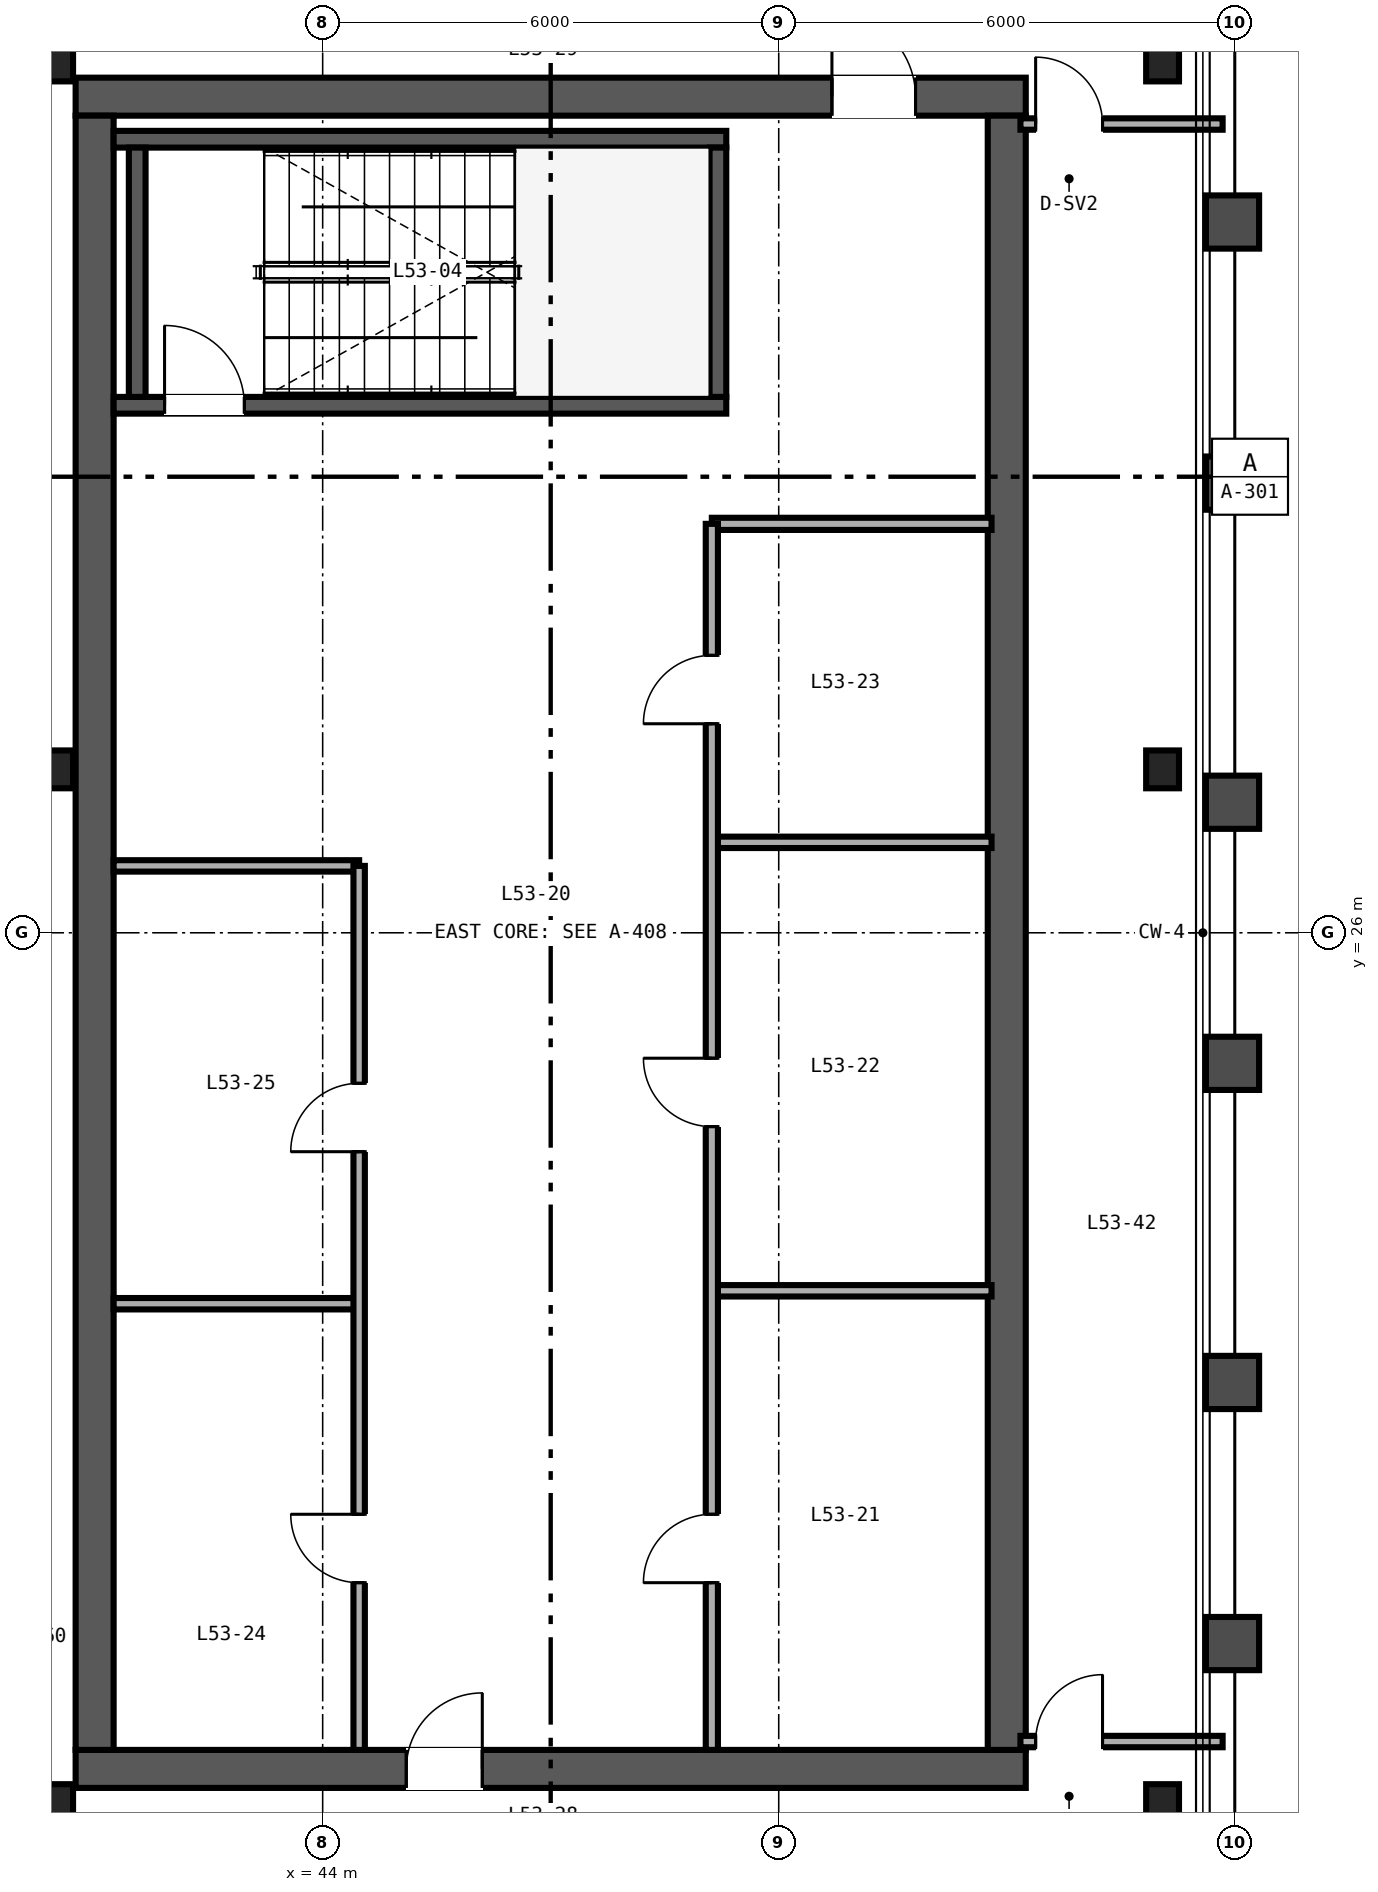
"""IFC4 building model, lengths in metres.
Left out: names, types, materials, properties, quantities, classifications, styles, units other than length and angle.
Written with IfcOpenShell. Run it as: python <this file> out.ifc"""

import sys

from ifc_helpers import new_model, si_unit, direction, frame, frame_2d, origin, origin_2d, place, context, subcontext, project, spatial, rectangle, i_section, extrude, source, transform, mapped, element, fill, save


model = new_model("IFC4")
c1 = context("Model", 3, precision=1e-05, world=origin(), true_north=direction((0.0, 1.0)))
c2 = subcontext(c1, "Body", "Model", "MODEL_VIEW")
j1 = project(units=[si_unit("LENGTHUNIT", "METRE"), si_unit("PLANEANGLEUNIT", "RADIAN")], contexts=[c1])
p1 = place(None, origin())
s1 = spatial("IfcSite", under=j1, at=p1, CompositionType="ELEMENT")
p2 = place(p1, origin())
s2 = spatial("IfcBuilding", under=s1, at=p2, CompositionType="ELEMENT")
p3 = place(p2, frame((0.0, 0.0, 210.0)))
s3 = spatial("IfcBuildingStorey", under=s2, at=p3, CompositionType="ELEMENT", Elevation=210.0)
p4 = place(p3, frame((40.75, 15.0, 0.0), z_axis=(0.0, 0.0, 1.0), x_axis=(1.0, 0.0, 0.0)))
e1 = element("IfcWall", 1, at=p4, inside=s3, PredefinedType="SHEAR", context=c2, shape_type="SweptSolid", body=[
    extrude(rectangle(XDim=12.5, YDim=0.5, at=frame_2d((6.25, 0.0))), origin(), (0.0, 0.0, 1.0), 3.37),
])
p5 = place(p4, frame((4.35, 0.0, 0.0)))
e2 = element("IfcOpeningElement", 2, at=p5, cuts=e1, PredefinedType="OPENING", context=c2, shape_type="SweptSolid", body=[
    extrude(rectangle(XDim=1.0, YDim=2.15, at=frame_2d((0.5, 1.075))), frame((0.0, 0.26, 0.0), z_axis=(0.0, -1.0, 0.0), x_axis=(1.0, 0.0, 0.0)), (0.0, 0.0, 1.0), 0.52),
])
p6 = place(p3, frame((40.75, 37.0, 0.0), z_axis=(0.0, 0.0, 1.0), x_axis=(1.0, 0.0, 0.0)))
e3 = element("IfcWall", 3, at=p6, inside=s3, PredefinedType="SHEAR", context=c2, shape_type="SweptSolid", body=[
    extrude(rectangle(XDim=12.5, YDim=0.5, at=frame_2d((6.25, 0.0))), origin(), (0.0, 0.0, 1.0), 3.37),
])
p7 = place(p6, frame((9.95, 0.0, 0.0)))
e4 = element("IfcOpeningElement", 4, at=p7, cuts=e3, PredefinedType="OPENING", context=c2, shape_type="SweptSolid", body=[
    extrude(rectangle(XDim=1.1, YDim=2.15, at=frame_2d((0.55, 1.075))), frame((0.0, 0.26, 0.0), z_axis=(0.0, -1.0, 0.0), x_axis=(1.0, 0.0, 0.0)), (0.0, 0.0, 1.0), 0.52),
])
for number, where, z_axis, x_axis in (
    (5, (41.0, 15.25, 0.0), (0.0, 0.0, 1.0), (0.0, 1.0, 0.0)),
    (6, (53.0, 15.25, 0.0), (0.0, 0.0, 1.0), (0.0, 1.0, 0.0)),
):
    element("IfcWall", number, at=place(p3, frame(where, z_axis=z_axis, x_axis=x_axis)), inside=s3, PredefinedType="SHEAR", context=c2, shape_type="SweptSolid", body=[
        extrude(rectangle(XDim=21.5, YDim=0.5, at=frame_2d((10.75, 0.0))), origin(), (0.0, 0.0, 1.0), 3.37),
    ])
p8 = place(p3, frame((41.25, 32.94, 0.0), z_axis=(0.0, 0.0, 1.0), x_axis=(1.0, 0.0, 0.0)))
e7 = element("IfcWall", 7, at=p8, inside=s3, PredefinedType="SHEAR", context=c2, shape_type="SweptSolid", body=[
    extrude(rectangle(XDim=8.06, YDim=0.22, at=frame_2d((4.03, 0.0))), origin(), (0.0, 0.0, 1.0), 3.4),
])
p9 = place(p8, frame((0.67, 0.0, 0.0)))
e8 = element("IfcOpeningElement", 8, at=p9, cuts=e7, PredefinedType="OPENING", context=c2, shape_type="SweptSolid", body=[
    extrude(rectangle(XDim=1.05, YDim=2.15, at=frame_2d((0.525, 1.075))), frame((0.0, 0.12, 0.0), z_axis=(0.0, -1.0, 0.0), x_axis=(1.0, 0.0, 0.0)), (0.0, 0.0, 1.0), 0.24),
])
p10 = place(p3, frame((41.25, 36.44, 0.0), z_axis=(0.0, 0.0, 1.0), x_axis=(1.0, 0.0, 0.0)))
e9 = element("IfcWall", 9, at=p10, inside=s3, PredefinedType="SHEAR", context=c2, shape_type="SweptSolid", body=[
    extrude(rectangle(XDim=8.06, YDim=0.22, at=frame_2d((4.03, 0.0))), origin(), (0.0, 0.0, 1.0), 3.4),
])
for number, where, z_axis, x_axis in (
    (10, (41.56, 33.05, 0.0), (0.0, 0.0, 1.0), (0.0, 1.0, 0.0)),
    (11, (49.2, 33.05, 0.0), (0.0, 0.0, 1.0), (0.0, 1.0, 0.0)),
):
    element("IfcWall", number, at=place(p3, frame(where, z_axis=z_axis, x_axis=x_axis)), inside=s3, PredefinedType="SHEAR", context=c2, shape_type="SweptSolid", body=[
        extrude(rectangle(XDim=3.28, YDim=0.22, at=frame_2d((1.64, 0.0))), origin(), (0.0, 0.0, 1.0), 3.4),
    ])
m1 = source(origin(), c2, "Body", "SweptSolid", [
    extrude(i_section(OverallWidth=0.432, OverallDepth=0.498, WebThickness=0.056, FlangeThickness=0.089, FilletRadius=0.025, at=origin_2d()), origin(), (0.0, 0.0, 1.0), 3.37),
])
for number, where, z_axis, x_axis in (
    (12, (40.5, 14.55, 0.0), (0.0, 0.0, 1.0), (1.0, 0.0, 0.0)),
    (13, (55.05, 14.55, 0.0), (0.0, 0.0, 1.0), (1.0, 0.0, 0.0)),
    (14, (40.5, 28.15, 0.0), (0.0, 0.0, 1.0), (1.0, 0.0, 0.0)),
    (15, (55.05, 28.15, 0.0), (0.0, 0.0, 1.0), (1.0, 0.0, 0.0)),
    (16, (40.5, 37.45, 0.0), (0.0, 0.0, 1.0), (1.0, 0.0, 0.0)),
    (17, (55.05, 37.45, 0.0), (0.0, 0.0, 1.0), (1.0, 0.0, 0.0)),
):
    element("IfcColumn", number, at=place(p3, frame(where, z_axis=z_axis, x_axis=x_axis)), inside=s3, PredefinedType="COLUMN", context=c2, shape_type="MappedRepresentation", body=[
        mapped(m1, transform((0.0, 0.0, 0.0), scale=1.0)),
    ])
p11 = place(p3, frame((49.12, 31.38, 0.0), z_axis=(0.0, 0.0, 1.0), x_axis=(1.0, 0.0, 0.0)))
e18 = element("IfcWall", 18, at=p11, inside=s3, PredefinedType="PARTITIONING", context=c2, shape_type="SweptSolid", body=[
    extrude(rectangle(XDim=3.68, YDim=0.16, at=frame_2d((1.84, 0.0))), origin(), (0.0, 0.0, 1.0), 2.47),
])
for number, where, z_axis, x_axis in (
    (19, (49.12, 21.29, 0.0), (0.0, 0.0, 1.0), (1.0, 0.0, 0.0)),
    (20, (49.12, 27.19, 0.0), (0.0, 0.0, 1.0), (1.0, 0.0, 0.0)),
):
    element("IfcWall", number, at=place(p3, frame(where, z_axis=z_axis, x_axis=x_axis)), inside=s3, PredefinedType="PARTITIONING", context=c2, shape_type="SweptSolid", body=[
        extrude(rectangle(XDim=3.68, YDim=0.15, at=frame_2d((1.84, 0.0))), origin(), (0.0, 0.0, 1.0), 3.37),
    ])
p12 = place(p3, frame((49.12, 15.25, 0.0), z_axis=(0.0, 0.0, 1.0), x_axis=(0.0, 1.0, 0.0)))
e21 = element("IfcWall", 21, at=p12, inside=s3, PredefinedType="PARTITIONING", context=c2, shape_type="SweptSolid", body=[
    extrude(rectangle(XDim=16.13, YDim=0.16, at=frame_2d((8.065, 0.0))), origin(), (0.0, 0.0, 1.0), 2.443),
])
p13 = place(p12, frame((2.2, 0.0, 0.0)))
e22 = element("IfcOpeningElement", 22, at=p13, cuts=e21, PredefinedType="OPENING", context=c2, shape_type="SweptSolid", body=[
    extrude(rectangle(XDim=0.9, YDim=2.15, at=frame_2d((0.45, 1.075))), frame((0.0, 0.09, 0.0), z_axis=(0.0, -1.0, 0.0), x_axis=(1.0, 0.0, 0.0)), (0.0, 0.0, 1.0), 0.18),
])
p14 = place(p12, frame((8.2, 0.0, 0.0)))
e23 = element("IfcOpeningElement", 23, at=p14, cuts=e21, PredefinedType="OPENING", context=c2, shape_type="SweptSolid", body=[
    extrude(rectangle(XDim=0.9, YDim=2.15, at=frame_2d((0.45, 1.075))), frame((0.0, 0.09, 0.0), z_axis=(0.0, -1.0, 0.0), x_axis=(1.0, 0.0, 0.0)), (0.0, 0.0, 1.0), 0.18),
])
p15 = place(p12, frame((13.5, 0.0, 0.0)))
e24 = element("IfcOpeningElement", 24, at=p15, cuts=e21, PredefinedType="OPENING", context=c2, shape_type="SweptSolid", body=[
    extrude(rectangle(XDim=0.9, YDim=2.15, at=frame_2d((0.45, 1.075))), frame((0.0, 0.09, 0.0), z_axis=(0.0, -1.0, 0.0), x_axis=(1.0, 0.0, 0.0)), (0.0, 0.0, 1.0), 0.18),
])
for number, where, z_axis, x_axis in (
    (25, (41.25, 26.88, 0.0), (0.0, 0.0, 1.0), (1.0, 0.0, 0.0)),
    (26, (41.25, 21.12, 0.0), (0.0, 0.0, 1.0), (1.0, 0.0, 0.0)),
):
    element("IfcWall", number, at=place(p3, frame(where, z_axis=z_axis, x_axis=x_axis)), inside=s3, PredefinedType="PARTITIONING", context=c2, shape_type="SweptSolid", body=[
        extrude(rectangle(XDim=3.23, YDim=0.15, at=frame_2d((1.615, 0.0))), origin(), (0.0, 0.0, 1.0), 3.37),
    ])
p16 = place(p3, frame((44.48, 15.25, 0.0), z_axis=(0.0, 0.0, 1.0), x_axis=(0.0, 1.0, 0.0)))
e27 = element("IfcWall", 27, at=p16, inside=s3, PredefinedType="PARTITIONING", context=c2, shape_type="SweptSolid", body=[
    extrude(rectangle(XDim=11.63, YDim=0.15, at=frame_2d((5.815, 0.0))), origin(), (0.0, 0.0, 1.0), 3.37),
])
p17 = place(p16, frame((2.2, 0.0, 0.0)))
e28 = element("IfcOpeningElement", 28, at=p17, cuts=e27, PredefinedType="OPENING", context=c2, shape_type="SweptSolid", body=[
    extrude(rectangle(XDim=0.9, YDim=2.15, at=frame_2d((0.45, 1.075))), frame((0.0, 0.085, 0.0), z_axis=(0.0, -1.0, 0.0), x_axis=(1.0, 0.0, 0.0)), (0.0, 0.0, 1.0), 0.17),
])
p18 = place(p16, frame((7.87, 0.0, 0.0)))
e29 = element("IfcOpeningElement", 29, at=p18, cuts=e27, PredefinedType="OPENING", context=c2, shape_type="SweptSolid", body=[
    extrude(rectangle(XDim=0.9, YDim=2.15, at=frame_2d((0.45, 1.075))), frame((0.0, 0.085, 0.0), z_axis=(0.0, -1.0, 0.0), x_axis=(1.0, 0.0, 0.0)), (0.0, 0.0, 1.0), 0.17),
])
p19 = place(p3, frame((53.18, 15.36, 0.0), z_axis=(0.0, 0.0, 1.0), x_axis=(1.0, 0.0, 0.0)))
e30 = element("IfcWall", 30, at=p19, inside=s3, PredefinedType="PARTITIONING", context=c2, shape_type="SweptSolid", body=[
    extrude(rectangle(XDim=2.66, YDim=0.15, at=frame_2d((1.33, 0.0))), origin(), (0.0, 0.0, 1.0), 2.591),
])
p20 = place(p19, frame((0.2, 0.0, 0.0)))
e31 = element("IfcOpeningElement", 31, at=p20, cuts=e30, PredefinedType="OPENING", context=c2, shape_type="SweptSolid", body=[
    extrude(rectangle(XDim=0.88, YDim=2.15, at=frame_2d((0.44, 1.075))), frame((0.0, 0.085, 0.0), z_axis=(0.0, -1.0, 0.0), x_axis=(1.0, 0.0, 0.0)), (0.0, 0.0, 1.0), 0.17),
])
p21 = place(p3, frame((53.18, 36.64, 0.0), z_axis=(0.0, 0.0, 1.0), x_axis=(1.0, 0.0, 0.0)))
e32 = element("IfcWall", 32, at=p21, inside=s3, PredefinedType="PARTITIONING", context=c2, shape_type="SweptSolid", body=[
    extrude(rectangle(XDim=2.66, YDim=0.15, at=frame_2d((1.33, 0.0))), origin(), (0.0, 0.0, 1.0), 2.753),
])
p22 = place(p21, frame((0.2, 0.0, 0.0)))
e33 = element("IfcOpeningElement", 33, at=p22, cuts=e32, PredefinedType="OPENING", context=c2, shape_type="SweptSolid", body=[
    extrude(rectangle(XDim=0.88, YDim=2.15, at=frame_2d((0.44, 1.075))), frame((0.0, 0.085, 0.0), z_axis=(0.0, -1.0, 0.0), x_axis=(1.0, 0.0, 0.0)), (0.0, 0.0, 1.0), 0.17),
])
m2 = source(origin(), c2, "Body", "SweptSolid", [
    extrude(rectangle(XDim=1.05, YDim=2.15, at=frame_2d((0.525, 1.075))), frame((0.0, 0.025, 0.0), z_axis=(0.0, -1.0, 0.0), x_axis=(1.0, 0.0, 0.0)), (0.0, 0.0, 1.0), 0.05),
])
p23 = place(p9, origin())
e34 = element("IfcDoor", 34, at=p23, inside=s3, OperationType="SINGLE_SWING_LEFT", PredefinedType="DOOR", context=c2, shape_type="MappedRepresentation", body=[
    mapped(m2, transform((0.0, 0.0, 0.0), scale=1.0)),
])
fill(e8, e34)
m3 = source(origin(), c2, "Body", "SweptSolid", [
    extrude(rectangle(XDim=1.0, YDim=2.15, at=frame_2d((0.5, 1.075))), frame((0.0, 0.025, 0.0), z_axis=(0.0, -1.0, 0.0), x_axis=(1.0, 0.0, 0.0)), (0.0, 0.0, 1.0), 0.05),
])
p24 = place(p5, origin())
e35 = element("IfcDoor", 35, at=p24, inside=s3, OperationType="SINGLE_SWING_RIGHT", PredefinedType="DOOR", context=c2, shape_type="MappedRepresentation", body=[
    mapped(m3, transform((0.0, 0.0, 0.0), scale=1.0)),
])
fill(e2, e35)
m4 = source(origin(), c2, "Body", "SweptSolid", [
    extrude(rectangle(XDim=1.1, YDim=2.15, at=frame_2d((0.55, 1.075))), frame((0.0, 0.025, 0.0), z_axis=(0.0, -1.0, 0.0), x_axis=(1.0, 0.0, 0.0)), (0.0, 0.0, 1.0), 0.05),
])
p25 = place(p7, origin())
e36 = element("IfcDoor", 36, at=p25, inside=s3, OperationType="SINGLE_SWING_LEFT", PredefinedType="DOOR", context=c2, shape_type="MappedRepresentation", body=[
    mapped(m4, transform((0.0, 0.0, 0.0), scale=1.0)),
])
fill(e4, e36)
m5 = source(origin(), c2, "Body", "SweptSolid", [
    extrude(rectangle(XDim=0.9, YDim=2.15, at=frame_2d((0.45, 1.075))), frame((0.0, 0.025, 0.0), z_axis=(0.0, -1.0, 0.0), x_axis=(1.0, 0.0, 0.0)), (0.0, 0.0, 1.0), 0.05),
])
p26 = place(p13, origin())
e37 = element("IfcDoor", 37, at=p26, inside=s3, OperationType="SINGLE_SWING_LEFT", PredefinedType="DOOR", context=c2, shape_type="MappedRepresentation", body=[
    mapped(m5, transform((0.0, 0.0, 0.0), scale=1.0)),
])
fill(e22, e37)
p27 = place(p14, origin())
e38 = element("IfcDoor", 38, at=p27, inside=s3, OperationType="SINGLE_SWING_RIGHT", PredefinedType="DOOR", context=c2, shape_type="MappedRepresentation", body=[
    mapped(m5, transform((0.0, 0.0, 0.0), scale=1.0)),
])
fill(e23, e38)
p28 = place(p15, origin())
e39 = element("IfcDoor", 39, at=p28, inside=s3, OperationType="SINGLE_SWING_LEFT", PredefinedType="DOOR", context=c2, shape_type="MappedRepresentation", body=[
    mapped(m5, transform((0.0, 0.0, 0.0), scale=1.0)),
])
fill(e24, e39)
p29 = place(p17, origin())
e40 = element("IfcDoor", 40, at=p29, inside=s3, OperationType="SINGLE_SWING_RIGHT", PredefinedType="DOOR", context=c2, shape_type="MappedRepresentation", body=[
    mapped(m5, transform((0.0, 0.0, 0.0), scale=1.0)),
])
fill(e28, e40)
p30 = place(p18, origin())
e41 = element("IfcDoor", 41, at=p30, inside=s3, OperationType="SINGLE_SWING_LEFT", PredefinedType="DOOR", context=c2, shape_type="MappedRepresentation", body=[
    mapped(m5, transform((0.0, 0.0, 0.0), scale=1.0)),
])
fill(e29, e41)
m6 = source(origin(), c2, "Body", "SweptSolid", [
    extrude(rectangle(XDim=0.88, YDim=2.15, at=frame_2d((0.44, 1.075))), frame((0.0, 0.025, 0.0), z_axis=(0.0, -1.0, 0.0), x_axis=(1.0, 0.0, 0.0)), (0.0, 0.0, 1.0), 0.05),
])
p31 = place(p20, origin())
e42 = element("IfcDoor", 42, at=p31, inside=s3, OperationType="SINGLE_SWING_RIGHT", PredefinedType="DOOR", context=c2, shape_type="MappedRepresentation", body=[
    mapped(m6, transform((0.0, 0.0, 0.0), scale=1.0)),
])
fill(e31, e42)
p32 = place(p22, origin())
e43 = element("IfcDoor", 43, at=p32, inside=s3, OperationType="SINGLE_SWING_LEFT", PredefinedType="DOOR", context=c2, shape_type="MappedRepresentation", body=[
    mapped(m6, transform((0.0, 0.0, 0.0), scale=1.0)),
])
fill(e33, e43)
save(model, sys.argv[1])
